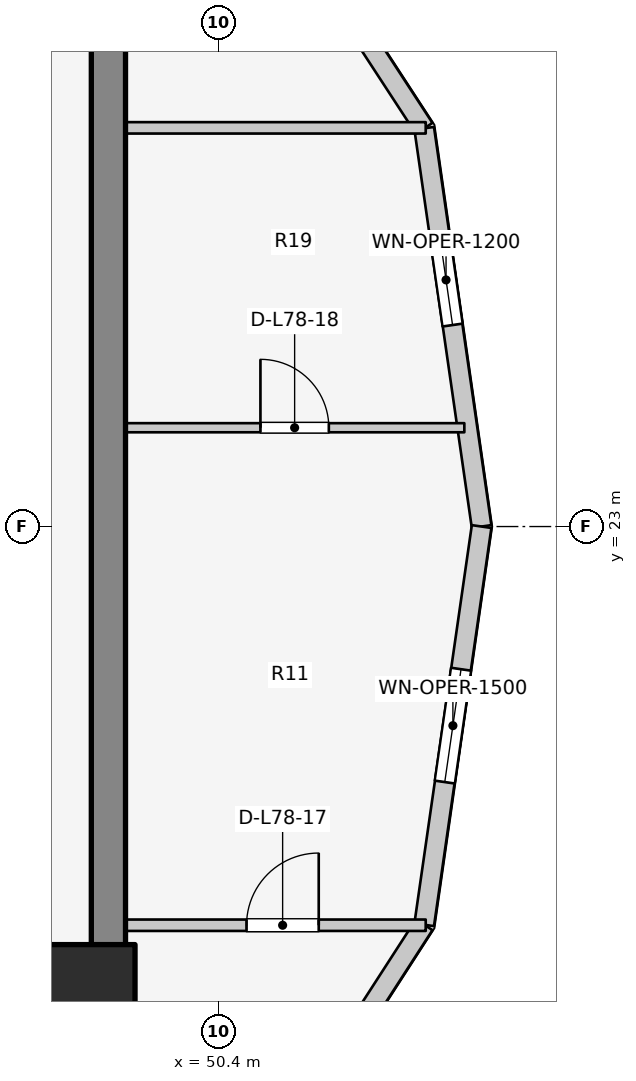
"""IFC4 building model, lengths in metres.
Left out: names, types, materials, properties, quantities, classifications, styles, units other than length and angle.
Written with IfcOpenShell. Run it as: python <this file> out.ifc"""

import sys

from ifc_helpers import new_model, si_unit, direction, frame, frame_2d, origin, origin_2d, place, context, subcontext, project, spatial, rectangle, extrude, element, fill, save


model = new_model("IFC4")
c1 = context("Model", 3, precision=1e-05, world=origin(), true_north=direction((0.0, 1.0)))
c2 = subcontext(c1, "Body", "Model", "MODEL_VIEW")
j1 = project(units=[si_unit("LENGTHUNIT", "METRE"), si_unit("PLANEANGLEUNIT", "RADIAN")], contexts=[c1])
p1 = place(None, origin())
s1 = spatial("IfcSite", under=j1, at=p1, CompositionType="ELEMENT")
p2 = place(p1, origin())
s2 = spatial("IfcBuilding", under=s1, at=p2, CompositionType="ELEMENT")
p3 = place(p2, frame((0.0, 0.0, 256.8)))
s3 = spatial("IfcBuildingStorey", under=s2, at=p3, CompositionType="ELEMENT", Elevation=256.8)
p4 = place(p3, frame((48.95, 17.05, 0.0), z_axis=(0.0, 0.0, 1.0), x_axis=(0.0, 1.0, 0.0)))
e1 = element("IfcWall", 1, at=p4, inside=s3, PredefinedType="SHEAR", context=c2, shape_type="SweptSolid", body=[
    extrude(rectangle(XDim=12.8, YDim=0.45, at=frame_2d((6.4, 0.0))), origin(), (0.0, 0.0, 1.0), 3.6),
])
p5 = place(p3, frame((48.7, 16.9, 0.0), z_axis=(0.0, 0.0, 1.0), x_axis=(1.0, 0.0, 0.0)))
e2 = element("IfcColumn", 2, at=p5, inside=s3, PredefinedType="COLUMN", context=c2, shape_type="SweptSolid", body=[
    extrude(rectangle(XDim=1.2, YDim=1.2, at=origin_2d()), origin(), (0.0, 0.0, 1.0), 3.6),
])
p6 = place(p3, frame((53.86, 23.0, 0.0), z_axis=(0.0, 0.0, 1.0), x_axis=(-0.142712754019, 0.989764148593, 0.0)))
e3 = element("IfcWall", 3, at=p6, inside=s3, PredefinedType="STANDARD", context=c2, shape_type="SweptSolid", body=[
    extrude(rectangle(XDim=5.293, YDim=0.26, at=frame_2d((2.646, 0.0))), origin(), (0.0, 0.0, 1.0), 3.07),
])
p7 = place(p6, frame((2.678, 0.0, 0.75)))
e4 = element("IfcOpeningElement", 4, at=p7, cuts=e3, PredefinedType="OPENING", context=c2, shape_type="SweptSolid", body=[
    extrude(rectangle(XDim=1.2, YDim=1.5, at=frame_2d((0.6, 0.75))), frame((0.0, 0.14, 0.0), z_axis=(0.0, -1.0, 0.0), x_axis=(1.0, 0.0, 0.0)), (0.0, 0.0, 1.0), 0.28),
])
p8 = place(p3, frame((53.105, 28.239, 0.0), z_axis=(0.0, 0.0, 1.0), x_axis=(-0.546606419826, 0.837389647539, 0.0)))
e5 = element("IfcWall", 5, at=p8, inside=s3, PredefinedType="STANDARD", context=c2, shape_type="SweptSolid", body=[
    extrude(rectangle(XDim=4.288, YDim=0.26, at=frame_2d((2.144, 0.0))), origin(), (0.0, 0.0, 1.0), 1.72),
])
p9 = place(p8, frame((1.544, 0.0, 0.15)))
e6 = element("IfcOpeningElement", 6, at=p9, cuts=e5, PredefinedType="OPENING", context=c2, shape_type="SweptSolid", body=[
    extrude(rectangle(XDim=1.2, YDim=0.9, at=frame_2d((0.6, 0.45))), frame((0.0, 0.14, 0.0), z_axis=(0.0, -1.0, 0.0), x_axis=(1.0, 0.0, 0.0)), (0.0, 0.0, 1.0), 0.28),
])
p10 = place(p3, frame((50.761, 14.133, 0.0), z_axis=(0.0, 0.0, 1.0), x_axis=(0.542641766008, 0.839964233634, 0.0)))
e7 = element("IfcWall", 7, at=p10, inside=s3, PredefinedType="STANDARD", context=c2, shape_type="SweptSolid", body=[
    extrude(rectangle(XDim=4.319, YDim=0.26, at=frame_2d((2.16, 0.0))), origin(), (0.0, 0.0, 1.0), 1.72),
])
p11 = place(p10, frame((1.56, 0.0, 0.15)))
e8 = element("IfcOpeningElement", 8, at=p11, cuts=e7, PredefinedType="OPENING", context=c2, shape_type="SweptSolid", body=[
    extrude(rectangle(XDim=1.2, YDim=0.9, at=frame_2d((0.6, 0.45))), frame((0.0, 0.14, 0.0), z_axis=(0.0, -1.0, 0.0), x_axis=(1.0, 0.0, 0.0)), (0.0, 0.0, 1.0), 0.28),
])
p12 = place(p3, frame((53.105, 17.761, 0.0), z_axis=(0.0, 0.0, 1.0), x_axis=(0.142712754019, 0.989764148593, 0.0)))
e9 = element("IfcWall", 9, at=p12, inside=s3, PredefinedType="STANDARD", context=c2, shape_type="SweptSolid", body=[
    extrude(rectangle(XDim=5.293, YDim=0.26, at=frame_2d((2.646, 0.0))), origin(), (0.0, 0.0, 1.0), 3.07),
])
p13 = place(p12, frame((1.896, 0.0, 0.75)))
e10 = element("IfcOpeningElement", 10, at=p13, cuts=e9, PredefinedType="OPENING", context=c2, shape_type="SweptSolid", body=[
    extrude(rectangle(XDim=1.5, YDim=1.6, at=frame_2d((0.75, 0.8))), frame((0.0, 0.14, 0.0), z_axis=(0.0, -1.0, 0.0), x_axis=(1.0, 0.0, 0.0)), (0.0, 0.0, 1.0), 0.28),
])
p14 = place(p3, frame((48.95, 17.755, 0.0), z_axis=(0.0, 0.0, 1.0), x_axis=(1.0, 0.0, 0.0)))
e11 = element("IfcWall", 11, at=p14, inside=s3, PredefinedType="PARTITIONING", context=c2, shape_type="SweptSolid", body=[
    extrude(rectangle(XDim=4.175, YDim=0.15, at=frame_2d((2.087, 0.0))), origin(), (0.0, 0.0, 1.0), 3.075),
])
p15 = place(p14, frame((1.817, 0.0, 0.0)))
e12 = element("IfcOpeningElement", 12, at=p15, cuts=e11, PredefinedType="OPENING", context=c2, shape_type="SweptSolid", body=[
    extrude(rectangle(XDim=0.95, YDim=2.1, at=frame_2d((0.475, 1.05))), frame((0.0, 0.085, 0.0), z_axis=(0.0, -1.0, 0.0), x_axis=(1.0, 0.0, 0.0)), (0.0, 0.0, 1.0), 0.17),
])
p16 = place(p3, frame((48.95, 28.245, 0.0), z_axis=(0.0, 0.0, 1.0), x_axis=(1.0, 0.0, 0.0)))
e13 = element("IfcWall", 13, at=p16, inside=s3, PredefinedType="PARTITIONING", context=c2, shape_type="SweptSolid", body=[
    extrude(rectangle(XDim=4.175, YDim=0.15, at=frame_2d((2.087, 0.0))), origin(), (0.0, 0.0, 1.0), 3.075),
])
p17 = place(p3, frame((48.95, 24.3, 0.0), z_axis=(0.0, 0.0, 1.0), x_axis=(1.0, 0.0, 0.0)))
e14 = element("IfcWall", 14, at=p17, inside=s3, PredefinedType="MOVABLE", context=c2, shape_type="SweptSolid", body=[
    extrude(rectangle(XDim=4.683, YDim=0.12, at=frame_2d((2.341, 0.0))), origin(), (0.0, 0.0, 1.0), 3.075),
])
p18 = place(p17, frame((2.0, 0.0, 0.0)))
e15 = element("IfcOpeningElement", 15, at=p18, cuts=e14, PredefinedType="OPENING", context=c2, shape_type="SweptSolid", body=[
    extrude(rectangle(XDim=0.9, YDim=2.1, at=frame_2d((0.45, 1.05))), frame((0.0, 0.07, 0.0), z_axis=(0.0, -1.0, 0.0), x_axis=(1.0, 0.0, 0.0)), (0.0, 0.0, 1.0), 0.14),
])
p19 = place(p7, origin())
e16 = element("IfcWindow", 16, at=p19, inside=s3, PartitioningType="SINGLE_PANEL", PredefinedType="WINDOW", context=c2, shape_type="SweptSolid", body=[
    extrude(rectangle(XDim=1.2, YDim=1.5, at=frame_2d((0.6, 0.75))), frame((0.0, 0.03, 0.0), z_axis=(0.0, -1.0, 0.0), x_axis=(1.0, 0.0, 0.0)), (0.0, 0.0, 1.0), 0.06),
])
fill(e4, e16)
p20 = place(p13, origin())
e17 = element("IfcWindow", 17, at=p20, inside=s3, PartitioningType="SINGLE_PANEL", PredefinedType="WINDOW", context=c2, shape_type="SweptSolid", body=[
    extrude(rectangle(XDim=1.5, YDim=1.6, at=frame_2d((0.75, 0.8))), frame((0.0, 0.03, 0.0), z_axis=(0.0, -1.0, 0.0), x_axis=(1.0, 0.0, 0.0)), (0.0, 0.0, 1.0), 0.06),
])
fill(e10, e17)
p21 = place(p15, origin())
e18 = element("IfcDoor", 18, at=p21, inside=s3, OperationType="SINGLE_SWING_RIGHT", PredefinedType="DOOR", context=c2, shape_type="SweptSolid", body=[
    extrude(rectangle(XDim=0.95, YDim=2.1, at=frame_2d((0.475, 1.05))), frame((0.0, 0.025, 0.0), z_axis=(0.0, -1.0, 0.0), x_axis=(1.0, 0.0, 0.0)), (0.0, 0.0, 1.0), 0.05),
])
fill(e12, e18)
p22 = place(p18, origin())
e19 = element("IfcDoor", 19, at=p22, inside=s3, OperationType="SINGLE_SWING_LEFT", PredefinedType="DOOR", context=c2, shape_type="SweptSolid", body=[
    extrude(rectangle(XDim=0.9, YDim=2.1, at=frame_2d((0.45, 1.05))), frame((0.0, 0.025, 0.0), z_axis=(0.0, -1.0, 0.0), x_axis=(1.0, 0.0, 0.0)), (0.0, 0.0, 1.0), 0.05),
])
fill(e15, e19)
save(model, sys.argv[1])
